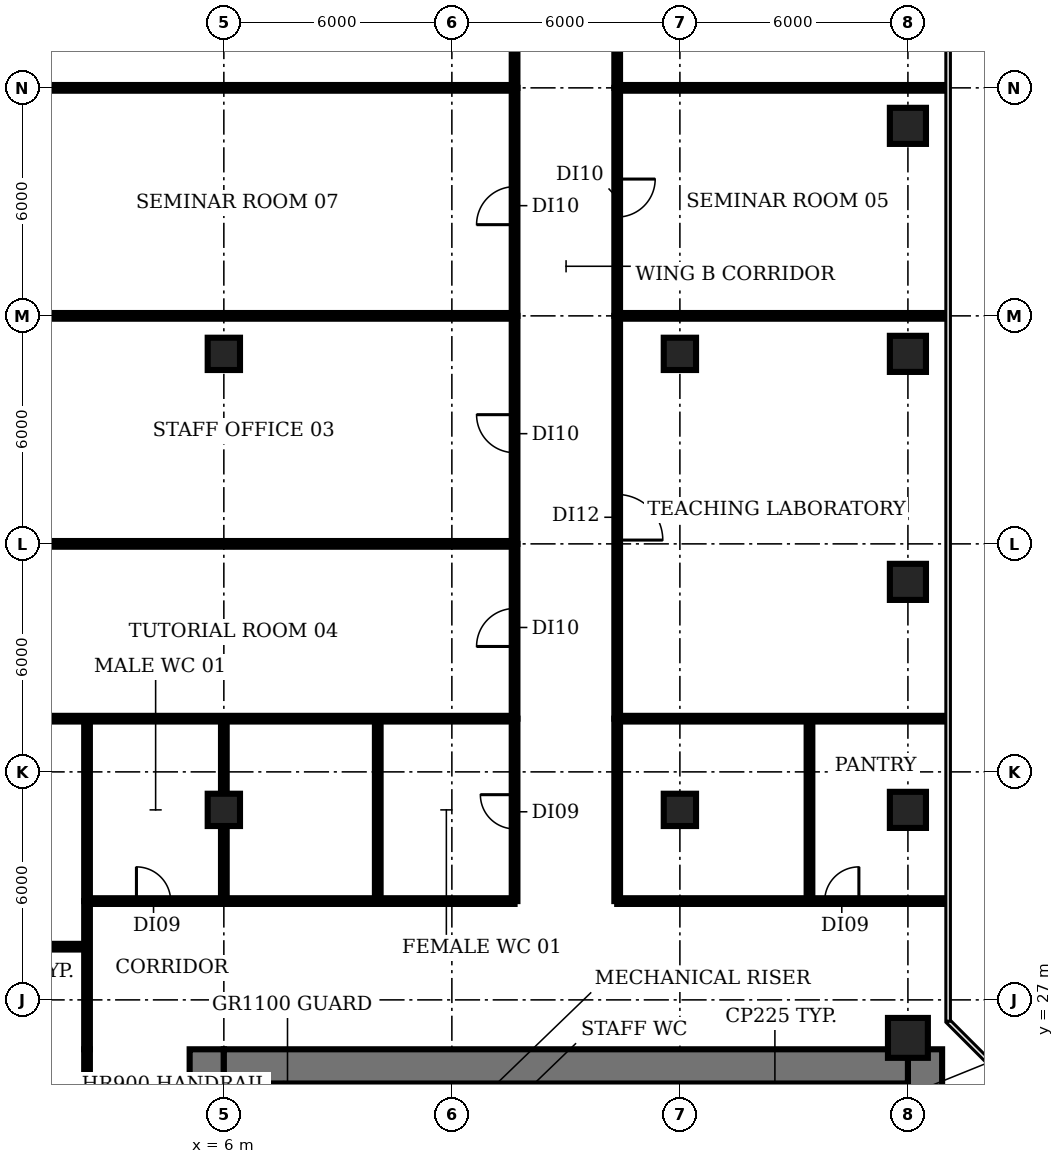
"""IFC4 building model, lengths in metres.
Left out: names, types, materials, properties, quantities, classifications, styles, units other than length and angle.
Written with IfcOpenShell. Run it as: python <this file> out.ifc"""

import sys

from ifc_helpers import new_model, si_unit, direction, frame, frame_2d, origin, origin_2d, place, context, subcontext, project, spatial, rectangle, circle, extrude, element, fill, save


model = new_model("IFC4")
c1 = context("Model", 3, precision=1e-05, world=origin(), true_north=direction((0.0, 1.0)))
c2 = subcontext(c1, "Body", "Model", "MODEL_VIEW")
j1 = project(units=[si_unit("LENGTHUNIT", "METRE"), si_unit("PLANEANGLEUNIT", "RADIAN")], contexts=[c1])
p1 = place(None, origin())
s1 = spatial("IfcSite", under=j1, at=p1, CompositionType="ELEMENT")
p2 = place(p1, origin())
s2 = spatial("IfcBuilding", under=s1, at=p2, CompositionType="ELEMENT")
p3 = place(p2, frame((0.0, 0.0, 66.8)))
s3 = spatial("IfcBuildingStorey", under=s2, at=p3, CompositionType="ELEMENT", Elevation=66.8)
for number, where, z_axis, x_axis in (
    (1, (6.0, 32.0, 0.0), (0.0, 0.0, 1.0), (1.0, 0.0, 0.0)),
    (2, (6.0, 44.0, 0.0), (0.0, 0.0, 1.0), (1.0, 0.0, 0.0)),
    (3, (18.0, 32.0, 0.0), (0.0, 0.0, 1.0), (1.0, 0.0, 0.0)),
    (4, (18.0, 44.0, 0.0), (0.0, 0.0, 1.0), (1.0, 0.0, 0.0)),
):
    element("IfcColumn", number, at=place(p3, frame(where, z_axis=z_axis, x_axis=x_axis)), inside=s3, PredefinedType="COLUMN", context=c2, shape_type="SweptSolid", body=[
        extrude(rectangle(XDim=0.85, YDim=0.85, at=origin_2d()), origin(), (0.0, 0.0, 1.0), 3.85),
    ])
p4 = place(p3, frame((24.0, 26.0, 0.0), z_axis=(0.0, 0.0, 1.0), x_axis=(1.0, 0.0, 0.0)))
e5 = element("IfcColumn", 5, at=p4, inside=s3, PredefinedType="COLUMN", context=c2, shape_type="SweptSolid", body=[
    extrude(circle(Radius=0.525, at=origin_2d()), origin(), (0.0, 0.0, 1.0), 3.85),
])
for number, where, z_axis, x_axis in (
    (6, (24.0, 32.0, 0.0), (0.0, 0.0, 1.0), (1.0, 0.0, 0.0)),
    (7, (24.0, 38.0, 0.0), (0.0, 0.0, 1.0), (1.0, 0.0, 0.0)),
    (8, (24.0, 44.0, 0.0), (0.0, 0.0, 1.0), (1.0, 0.0, 0.0)),
    (9, (24.0, 50.0, 0.0), (0.0, 0.0, 1.0), (1.0, 0.0, 0.0)),
):
    element("IfcColumn", number, at=place(p3, frame(where, z_axis=z_axis, x_axis=x_axis)), inside=s3, PredefinedType="COLUMN", context=c2, shape_type="SweptSolid", body=[
        extrude(rectangle(XDim=0.95, YDim=0.95, at=origin_2d()), origin(), (0.0, 0.0, 1.0), 3.85),
    ])
p5 = place(p3, frame((9.275, 18.375, 0.0), z_axis=(0.0, 0.0, 1.0), x_axis=(0.0, 1.0, 0.0)))
e10 = element("IfcWall", 10, at=p5, inside=s3, PredefinedType="SHEAR", context=c2, shape_type="SweptSolid", body=[
    extrude(rectangle(XDim=6.425, YDim=0.25, at=frame_2d((3.212, 0.0))), origin(), (0.0, 0.0, 1.0), 3.85),
])
for number, where, z_axis, x_axis in (
    (11, (15.1, 22.9, 0.0), (0.0, 0.0, 1.0), (0.0, 1.0, 0.0)),
    (12, (20.7, 22.9, 0.0), (0.0, 0.0, 1.0), (0.0, 1.0, 0.0)),
):
    element("IfcWall", number, at=place(p3, frame(where, z_axis=z_axis, x_axis=x_axis)), inside=s3, PredefinedType="SHEAR", context=c2, shape_type="SweptSolid", body=[
        extrude(rectangle(XDim=1.9, YDim=0.2, at=frame_2d((0.95, 0.0))), origin(), (0.0, 0.0, 1.0), 3.85),
    ])
p6 = place(p3, frame((5.55, 4.5, 0.0), z_axis=(0.0, 0.0, 1.0), x_axis=(0.0, 1.0, 0.0)))
e13 = element("IfcWall", 13, at=p6, inside=s3, PredefinedType="SHEAR", context=c2, shape_type="SweptSolid", body=[
    extrude(rectangle(XDim=21.2, YDim=0.9, at=frame_2d((10.6, 0.0))), origin(), (0.0, 0.0, 1.0), 3.85),
])
p7 = place(p6, frame((1.15, 0.0, 0.0)))
e14 = element("IfcOpeningElement", 14, at=p7, cuts=e13, PredefinedType="OPENING", context=c2, shape_type="SweptSolid", body=[
    extrude(rectangle(XDim=1.5, YDim=2.1, at=frame_2d((0.75, 1.05))), frame((0.0, 0.46, 0.0), z_axis=(0.0, -1.0, 0.0), x_axis=(1.0, 0.0, 0.0)), (0.0, 0.0, 1.0), 0.92),
])
p8 = place(p6, frame((7.6, 0.0, 0.0)))
e15 = element("IfcOpeningElement", 15, at=p8, cuts=e13, PredefinedType="OPENING", context=c2, shape_type="SweptSolid", body=[
    extrude(rectangle(XDim=1.2, YDim=2.1, at=frame_2d((0.6, 1.05))), frame((0.0, 0.46, 0.0), z_axis=(0.0, -1.0, 0.0), x_axis=(1.0, 0.0, 0.0)), (0.0, 0.0, 1.0), 0.92),
])
p9 = place(p6, frame((14.15, 0.0, 0.0)))
e16 = element("IfcOpeningElement", 16, at=p9, cuts=e13, PredefinedType="OPENING", context=c2, shape_type="SweptSolid", body=[
    extrude(rectangle(XDim=1.2, YDim=2.1, at=frame_2d((0.6, 1.05))), frame((0.0, 0.46, 0.0), z_axis=(0.0, -1.0, 0.0), x_axis=(1.0, 0.0, 0.0)), (0.0, 0.0, 1.0), 0.92),
])
p10 = place(p3, frame((24.45, 25.7, 0.0), z_axis=(0.0, 0.0, 1.0), x_axis=(0.0, -1.0, 0.0)))
e17 = element("IfcWall", 17, at=p10, inside=s3, PredefinedType="SHEAR", context=c2, shape_type="SweptSolid", body=[
    extrude(rectangle(XDim=21.2, YDim=0.9, at=frame_2d((10.6, 0.0))), origin(), (0.0, 0.0, 1.0), 3.85),
])
p11 = place(p10, frame((18.55, 0.0, 0.0)))
e18 = element("IfcOpeningElement", 18, at=p11, cuts=e17, PredefinedType="OPENING", context=c2, shape_type="SweptSolid", body=[
    extrude(rectangle(XDim=1.5, YDim=2.1, at=frame_2d((0.75, 1.05))), frame((0.0, 0.46, 0.0), z_axis=(0.0, -1.0, 0.0), x_axis=(1.0, 0.0, 0.0)), (0.0, 0.0, 1.0), 0.92),
])
p12 = place(p10, frame((12.45, 0.0, 0.0)))
e19 = element("IfcOpeningElement", 19, at=p12, cuts=e17, PredefinedType="OPENING", context=c2, shape_type="SweptSolid", body=[
    extrude(rectangle(XDim=0.9, YDim=2.1, at=frame_2d((0.45, 1.05))), frame((0.0, 0.46, 0.0), z_axis=(0.0, -1.0, 0.0), x_axis=(1.0, 0.0, 0.0)), (0.0, 0.0, 1.0), 0.92),
])
p13 = place(p10, frame((6.45, 0.0, 0.0)))
e20 = element("IfcOpeningElement", 20, at=p13, cuts=e17, PredefinedType="OPENING", context=c2, shape_type="SweptSolid", body=[
    extrude(rectangle(XDim=2.0, YDim=2.1, at=frame_2d((1.0, 1.05))), frame((0.0, 0.46, 0.0), z_axis=(0.0, -1.0, 0.0), x_axis=(1.0, 0.0, 0.0)), (0.0, 0.0, 1.0), 0.92),
])
p14 = place(p3, frame((6.0, 25.25, 0.0), z_axis=(0.0, 0.0, 1.0), x_axis=(1.0, 0.0, 0.0)))
e21 = element("IfcWall", 21, at=p14, inside=s3, PredefinedType="SHEAR", context=c2, shape_type="SweptSolid", body=[
    extrude(rectangle(XDim=18.0, YDim=0.9, at=frame_2d((9.0, 0.0))), origin(), (0.0, 0.0, 1.0), 3.85),
])
p15 = place(p3, frame((-1.01, 28.4, 0.0), z_axis=(0.0, 0.0, 1.0), x_axis=(1.0, 0.0, 0.0)))
e22 = element("IfcWall", 22, at=p15, inside=s3, PredefinedType="PARTITIONING", context=c2, shape_type="SweptSolid", body=[
    extrude(rectangle(XDim=3.41, YDim=0.15, at=frame_2d((1.705, 0.0))), origin(), (0.0, 0.0, 1.0), 2.83),
])
for number, where, z_axis, x_axis in (
    (23, (-1.01, 34.4, 0.0), (0.0, 0.0, 1.0), (1.0, 0.0, 0.0)),
    (24, (-1.01, 39.0, 0.0), (0.0, 0.0, 1.0), (1.0, 0.0, 0.0)),
    (25, (-1.01, 45.0, 0.0), (0.0, 0.0, 1.0), (1.0, 0.0, 0.0)),
    (26, (-1.01, 51.0, 0.0), (0.0, 0.0, 1.0), (1.0, 0.0, 0.0)),
):
    element("IfcWall", number, at=place(p3, frame(where, z_axis=z_axis, x_axis=x_axis)), inside=s3, PredefinedType="PARTITIONING", context=c2, shape_type="SweptSolid", body=[
        extrude(rectangle(XDim=14.66, YDim=0.15, at=frame_2d((7.33, 0.0))), origin(), (0.0, 0.0, 1.0), 2.83),
    ])
p16 = place(p3, frame((2.4, 4.5, 0.0), z_axis=(0.0, 0.0, 1.0), x_axis=(0.0, 1.0, 0.0)))
e27 = element("IfcWall", 27, at=p16, inside=s3, PredefinedType="PARTITIONING", context=c2, shape_type="SweptSolid", body=[
    extrude(rectangle(XDim=21.2, YDim=0.15, at=frame_2d((10.6, 0.0))), origin(), (0.0, 0.0, 1.0), 2.83),
])
p17 = place(p16, frame((10.8, 0.0, 0.0)))
e28 = element("IfcOpeningElement", 28, at=p17, cuts=e27, PredefinedType="OPENING", context=c2, shape_type="SweptSolid", body=[
    extrude(rectangle(XDim=1.2, YDim=2.1, at=frame_2d((0.6, 1.05))), frame((0.0, 0.085, 0.0), z_axis=(0.0, -1.0, 0.0), x_axis=(1.0, 0.0, 0.0)), (0.0, 0.0, 1.0), 0.17),
])
p18 = place(p3, frame((2.4, 25.7, 0.0), z_axis=(0.0, 0.0, 1.0), x_axis=(0.0, 1.0, 0.0)))
e29 = element("IfcWall", 29, at=p18, inside=s3, PredefinedType="PARTITIONING", context=c2, shape_type="SweptSolid", body=[
    extrude(rectangle(XDim=3.9, YDim=0.15, at=frame_2d((1.95, 0.0))), origin(), (0.0, 0.0, 1.0), 2.83),
])
p19 = place(p3, frame((2.4, 29.6, 0.0), z_axis=(0.0, 0.0, 1.0), x_axis=(0.0, 1.0, 0.0)))
e30 = element("IfcWall", 30, at=p19, inside=s3, PredefinedType="PARTITIONING", context=c2, shape_type="SweptSolid", body=[
    extrude(rectangle(XDim=4.8, YDim=0.15, at=frame_2d((2.4, 0.0))), origin(), (0.0, 0.0, 1.0), 2.83),
])
p20 = place(p3, frame((2.4, 29.6, 0.0), z_axis=(0.0, 0.0, 1.0), x_axis=(1.0, 0.0, 0.0)))
e31 = element("IfcWall", 31, at=p20, inside=s3, PredefinedType="PARTITIONING", context=c2, shape_type="SweptSolid", body=[
    extrude(rectangle(XDim=3.6, YDim=0.15, at=frame_2d((1.8, 0.0))), origin(), (0.0, 0.0, 1.0), 2.83),
])
p21 = place(p20, frame((1.3, 0.0, 0.0)))
e32 = element("IfcOpeningElement", 32, at=p21, cuts=e31, PredefinedType="OPENING", context=c2, shape_type="SweptSolid", body=[
    extrude(rectangle(XDim=0.9, YDim=2.1, at=frame_2d((0.45, 1.05))), frame((0.0, 0.085, 0.0), z_axis=(0.0, -1.0, 0.0), x_axis=(1.0, 0.0, 0.0)), (0.0, 0.0, 1.0), 0.17),
])
p22 = place(p3, frame((6.0, 29.6, 0.0), z_axis=(0.0, 0.0, 1.0), x_axis=(0.0, 1.0, 0.0)))
e33 = element("IfcWall", 33, at=p22, inside=s3, PredefinedType="PARTITIONING", context=c2, shape_type="SweptSolid", body=[
    extrude(rectangle(XDim=4.8, YDim=0.15, at=frame_2d((2.4, 0.0))), origin(), (0.0, 0.0, 1.0), 2.83),
])
p23 = place(p3, frame((6.0, 29.6, 0.0), z_axis=(0.0, 0.0, 1.0), x_axis=(1.0, 0.0, 0.0)))
e34 = element("IfcWall", 34, at=p23, inside=s3, PredefinedType="PARTITIONING", context=c2, shape_type="SweptSolid", body=[
    extrude(rectangle(XDim=7.65, YDim=0.15, at=frame_2d((3.825, 0.0))), origin(), (0.0, 0.0, 1.0), 2.83),
])
p24 = place(p3, frame((10.05, 29.6, 0.0), z_axis=(0.0, 0.0, 1.0), x_axis=(0.0, 1.0, 0.0)))
e35 = element("IfcWall", 35, at=p24, inside=s3, PredefinedType="PARTITIONING", context=c2, shape_type="SweptSolid", body=[
    extrude(rectangle(XDim=4.8, YDim=0.15, at=frame_2d((2.4, 0.0))), origin(), (0.0, 0.0, 1.0), 2.83),
])
p25 = place(p3, frame((13.65, 29.6, 0.0), z_axis=(0.0, 0.0, 1.0), x_axis=(0.0, 1.0, 0.0)))
e36 = element("IfcWall", 36, at=p25, inside=s3, PredefinedType="PARTITIONING", context=c2, shape_type="SweptSolid", body=[
    extrude(rectangle(XDim=4.8, YDim=0.15, at=frame_2d((2.4, 0.0))), origin(), (0.0, 0.0, 1.0), 2.83),
])
p26 = place(p25, frame((1.9, 0.0, 0.0)))
e37 = element("IfcOpeningElement", 37, at=p26, cuts=e36, PredefinedType="OPENING", context=c2, shape_type="SweptSolid", body=[
    extrude(rectangle(XDim=0.9, YDim=2.1, at=frame_2d((0.45, 1.05))), frame((0.0, 0.085, 0.0), z_axis=(0.0, -1.0, 0.0), x_axis=(1.0, 0.0, 0.0)), (0.0, 0.0, 1.0), 0.17),
])
p27 = place(p3, frame((13.65, 34.4, 0.0), z_axis=(0.0, 0.0, 1.0), x_axis=(0.0, 1.0, 0.0)))
e38 = element("IfcWall", 38, at=p27, inside=s3, PredefinedType="PARTITIONING", context=c2, shape_type="SweptSolid", body=[
    extrude(rectangle(XDim=4.6, YDim=0.15, at=frame_2d((2.3, 0.0))), origin(), (0.0, 0.0, 1.0), 2.83),
])
p28 = place(p27, frame((1.9, 0.0, 0.0)))
e39 = element("IfcOpeningElement", 39, at=p28, cuts=e38, PredefinedType="OPENING", context=c2, shape_type="SweptSolid", body=[
    extrude(rectangle(XDim=1.0, YDim=2.1, at=frame_2d((0.5, 1.05))), frame((0.0, 0.085, 0.0), z_axis=(0.0, -1.0, 0.0), x_axis=(1.0, 0.0, 0.0)), (0.0, 0.0, 1.0), 0.17),
])
p29 = place(p3, frame((13.65, 39.0, 0.0), z_axis=(0.0, 0.0, 1.0), x_axis=(0.0, 1.0, 0.0)))
e40 = element("IfcWall", 40, at=p29, inside=s3, PredefinedType="PARTITIONING", context=c2, shape_type="SweptSolid", body=[
    extrude(rectangle(XDim=6.0, YDim=0.15, at=frame_2d((3.0, 0.0))), origin(), (0.0, 0.0, 1.0), 2.83),
])
p30 = place(p29, frame((2.4, 0.0, 0.0)))
e41 = element("IfcOpeningElement", 41, at=p30, cuts=e40, PredefinedType="OPENING", context=c2, shape_type="SweptSolid", body=[
    extrude(rectangle(XDim=1.0, YDim=2.1, at=frame_2d((0.5, 1.05))), frame((0.0, 0.085, 0.0), z_axis=(0.0, -1.0, 0.0), x_axis=(1.0, 0.0, 0.0)), (0.0, 0.0, 1.0), 0.17),
])
p31 = place(p3, frame((13.65, 45.0, 0.0), z_axis=(0.0, 0.0, 1.0), x_axis=(0.0, 1.0, 0.0)))
e42 = element("IfcWall", 42, at=p31, inside=s3, PredefinedType="PARTITIONING", context=c2, shape_type="SweptSolid", body=[
    extrude(rectangle(XDim=6.0, YDim=0.15, at=frame_2d((3.0, 0.0))), origin(), (0.0, 0.0, 1.0), 2.83),
])
p32 = place(p31, frame((2.4, 0.0, 0.0)))
e43 = element("IfcOpeningElement", 43, at=p32, cuts=e42, PredefinedType="OPENING", context=c2, shape_type="SweptSolid", body=[
    extrude(rectangle(XDim=1.0, YDim=2.1, at=frame_2d((0.5, 1.05))), frame((0.0, 0.085, 0.0), z_axis=(0.0, -1.0, 0.0), x_axis=(1.0, 0.0, 0.0)), (0.0, 0.0, 1.0), 0.17),
])
p33 = place(p3, frame((13.65, 51.0, 0.0), z_axis=(0.0, 0.0, 1.0), x_axis=(0.0, 1.0, 0.0)))
e44 = element("IfcWall", 44, at=p33, inside=s3, PredefinedType="PARTITIONING", context=c2, shape_type="SweptSolid", body=[
    extrude(rectangle(XDim=6.0, YDim=0.15, at=frame_2d((3.0, 0.0))), origin(), (0.0, 0.0, 1.0), 2.83),
])
p34 = place(p33, frame((2.4, 0.0, 0.0)))
e45 = element("IfcOpeningElement", 45, at=p34, cuts=e44, PredefinedType="OPENING", context=c2, shape_type="SweptSolid", body=[
    extrude(rectangle(XDim=1.0, YDim=2.1, at=frame_2d((0.5, 1.05))), frame((0.0, 0.085, 0.0), z_axis=(0.0, -1.0, 0.0), x_axis=(1.0, 0.0, 0.0)), (0.0, 0.0, 1.0), 0.17),
])
p35 = place(p3, frame((16.35, 29.6, 0.0), z_axis=(0.0, 0.0, 1.0), x_axis=(0.0, 1.0, 0.0)))
e46 = element("IfcWall", 46, at=p35, inside=s3, PredefinedType="PARTITIONING", context=c2, shape_type="SweptSolid", body=[
    extrude(rectangle(XDim=4.8, YDim=0.15, at=frame_2d((2.4, 0.0))), origin(), (0.0, 0.0, 1.0), 2.83),
])
p36 = place(p3, frame((16.35, 29.6, 0.0), z_axis=(0.0, 0.0, 1.0), x_axis=(1.0, 0.0, 0.0)))
e47 = element("IfcWall", 47, at=p36, inside=s3, PredefinedType="PARTITIONING", context=c2, shape_type="SweptSolid", body=[
    extrude(rectangle(XDim=5.06, YDim=0.15, at=frame_2d((2.53, 0.0))), origin(), (0.0, 0.0, 1.0), 2.83),
])
p37 = place(p3, frame((16.35, 34.4, 0.0), z_axis=(0.0, 0.0, 1.0), x_axis=(1.0, 0.0, 0.0)))
e48 = element("IfcWall", 48, at=p37, inside=s3, PredefinedType="PARTITIONING", context=c2, shape_type="SweptSolid", body=[
    extrude(rectangle(XDim=8.66, YDim=0.15, at=frame_2d((4.33, 0.0))), origin(), (0.0, 0.0, 1.0), 2.83),
])
p38 = place(p3, frame((16.35, 45.0, 0.0), z_axis=(0.0, 0.0, 1.0), x_axis=(0.0, -1.0, 0.0)))
e49 = element("IfcWall", 49, at=p38, inside=s3, PredefinedType="PARTITIONING", context=c2, shape_type="SweptSolid", body=[
    extrude(rectangle(XDim=10.6, YDim=0.15, at=frame_2d((5.3, 0.0))), origin(), (0.0, 0.0, 1.0), 2.83),
])
p39 = place(p38, frame((4.7, 0.0, 0.0)))
e50 = element("IfcOpeningElement", 50, at=p39, cuts=e49, PredefinedType="OPENING", context=c2, shape_type="SweptSolid", body=[
    extrude(rectangle(XDim=1.2, YDim=2.1, at=frame_2d((0.6, 1.05))), frame((0.0, 0.085, 0.0), z_axis=(0.0, -1.0, 0.0), x_axis=(1.0, 0.0, 0.0)), (0.0, 0.0, 1.0), 0.17),
])
p40 = place(p3, frame((16.35, 45.0, 0.0), z_axis=(0.0, 0.0, 1.0), x_axis=(1.0, 0.0, 0.0)))
e51 = element("IfcWall", 51, at=p40, inside=s3, PredefinedType="PARTITIONING", context=c2, shape_type="SweptSolid", body=[
    extrude(rectangle(XDim=8.66, YDim=0.15, at=frame_2d((4.33, 0.0))), origin(), (0.0, 0.0, 1.0), 2.83),
])
p41 = place(p3, frame((16.35, 51.0, 0.0), z_axis=(0.0, 0.0, 1.0), x_axis=(0.0, -1.0, 0.0)))
e52 = element("IfcWall", 52, at=p41, inside=s3, PredefinedType="PARTITIONING", context=c2, shape_type="SweptSolid", body=[
    extrude(rectangle(XDim=6.0, YDim=0.15, at=frame_2d((3.0, 0.0))), origin(), (0.0, 0.0, 1.0), 2.83),
])
p42 = place(p41, frame((2.4, 0.0, 0.0)))
e53 = element("IfcOpeningElement", 53, at=p42, cuts=e52, PredefinedType="OPENING", context=c2, shape_type="SweptSolid", body=[
    extrude(rectangle(XDim=1.0, YDim=2.1, at=frame_2d((0.5, 1.05))), frame((0.0, 0.085, 0.0), z_axis=(0.0, -1.0, 0.0), x_axis=(1.0, 0.0, 0.0)), (0.0, 0.0, 1.0), 0.17),
])
p43 = place(p3, frame((16.35, 51.0, 0.0), z_axis=(0.0, 0.0, 1.0), x_axis=(1.0, 0.0, 0.0)))
e54 = element("IfcWall", 54, at=p43, inside=s3, PredefinedType="PARTITIONING", context=c2, shape_type="SweptSolid", body=[
    extrude(rectangle(XDim=8.66, YDim=0.15, at=frame_2d((4.33, 0.0))), origin(), (0.0, 0.0, 1.0), 2.83),
])
p44 = place(p3, frame((16.35, 57.0, 0.0), z_axis=(0.0, 0.0, 1.0), x_axis=(0.0, -1.0, 0.0)))
e55 = element("IfcWall", 55, at=p44, inside=s3, PredefinedType="PARTITIONING", context=c2, shape_type="SweptSolid", body=[
    extrude(rectangle(XDim=6.0, YDim=0.15, at=frame_2d((3.0, 0.0))), origin(), (0.0, 0.0, 1.0), 2.83),
])
p45 = place(p44, frame((3.3, 0.0, 0.0)))
e56 = element("IfcOpeningElement", 56, at=p45, cuts=e55, PredefinedType="OPENING", context=c2, shape_type="SweptSolid", body=[
    extrude(rectangle(XDim=1.0, YDim=2.1, at=frame_2d((0.5, 1.05))), frame((0.0, 0.085, 0.0), z_axis=(0.0, -1.0, 0.0), x_axis=(1.0, 0.0, 0.0)), (0.0, 0.0, 1.0), 0.17),
])
p46 = place(p3, frame((21.41, 29.6, 0.0), z_axis=(0.0, 0.0, 1.0), x_axis=(0.0, 1.0, 0.0)))
e57 = element("IfcWall", 57, at=p46, inside=s3, PredefinedType="PARTITIONING", context=c2, shape_type="SweptSolid", body=[
    extrude(rectangle(XDim=4.8, YDim=0.15, at=frame_2d((2.4, 0.0))), origin(), (0.0, 0.0, 1.0), 2.83),
])
p47 = place(p3, frame((21.41, 29.6, 0.0), z_axis=(0.0, 0.0, 1.0), x_axis=(1.0, 0.0, 0.0)))
e58 = element("IfcWall", 58, at=p47, inside=s3, PredefinedType="PARTITIONING", context=c2, shape_type="SweptSolid", body=[
    extrude(rectangle(XDim=3.6, YDim=0.15, at=frame_2d((1.8, 0.0))), origin(), (0.0, 0.0, 1.0), 2.83),
])
p48 = place(p47, frame((0.4, 0.0, 0.0)))
e59 = element("IfcOpeningElement", 59, at=p48, cuts=e58, PredefinedType="OPENING", context=c2, shape_type="SweptSolid", body=[
    extrude(rectangle(XDim=0.9, YDim=2.1, at=frame_2d((0.45, 1.05))), frame((0.0, 0.085, 0.0), z_axis=(0.0, -1.0, 0.0), x_axis=(1.0, 0.0, 0.0)), (0.0, 0.0, 1.0), 0.17),
])
p49 = place(p21, origin())
e60 = element("IfcDoor", 60, at=p49, inside=s3, OperationType="SINGLE_SWING_LEFT", PredefinedType="DOOR", context=c2, shape_type="SweptSolid", body=[
    extrude(rectangle(XDim=0.9, YDim=2.1, at=frame_2d((0.45, 1.05))), frame((0.0, 0.025, 0.0), z_axis=(0.0, -1.0, 0.0), x_axis=(1.0, 0.0, 0.0)), (0.0, 0.0, 1.0), 0.05),
])
fill(e32, e60)
p50 = place(p26, origin())
e61 = element("IfcDoor", 61, at=p50, inside=s3, OperationType="SINGLE_SWING_RIGHT", PredefinedType="DOOR", context=c2, shape_type="SweptSolid", body=[
    extrude(rectangle(XDim=0.9, YDim=2.1, at=frame_2d((0.45, 1.05))), frame((0.0, 0.025, 0.0), z_axis=(0.0, -1.0, 0.0), x_axis=(1.0, 0.0, 0.0)), (0.0, 0.0, 1.0), 0.05),
])
fill(e37, e61)
p51 = place(p28, origin())
e62 = element("IfcDoor", 62, at=p51, inside=s3, OperationType="SINGLE_SWING_LEFT", PredefinedType="DOOR", context=c2, shape_type="SweptSolid", body=[
    extrude(rectangle(XDim=1.0, YDim=2.1, at=frame_2d((0.5, 1.05))), frame((0.0, 0.025, 0.0), z_axis=(0.0, -1.0, 0.0), x_axis=(1.0, 0.0, 0.0)), (0.0, 0.0, 1.0), 0.05),
])
fill(e39, e62)
p52 = place(p30, origin())
e63 = element("IfcDoor", 63, at=p52, inside=s3, OperationType="SINGLE_SWING_RIGHT", PredefinedType="DOOR", context=c2, shape_type="SweptSolid", body=[
    extrude(rectangle(XDim=1.0, YDim=2.1, at=frame_2d((0.5, 1.05))), frame((0.0, 0.025, 0.0), z_axis=(0.0, -1.0, 0.0), x_axis=(1.0, 0.0, 0.0)), (0.0, 0.0, 1.0), 0.05),
])
fill(e41, e63)
p53 = place(p32, origin())
e64 = element("IfcDoor", 64, at=p53, inside=s3, OperationType="SINGLE_SWING_LEFT", PredefinedType="DOOR", context=c2, shape_type="SweptSolid", body=[
    extrude(rectangle(XDim=1.0, YDim=2.1, at=frame_2d((0.5, 1.05))), frame((0.0, 0.025, 0.0), z_axis=(0.0, -1.0, 0.0), x_axis=(1.0, 0.0, 0.0)), (0.0, 0.0, 1.0), 0.05),
])
fill(e43, e64)
p54 = place(p39, origin())
e65 = element("IfcDoor", 65, at=p54, inside=s3, OperationType="SINGLE_SWING_RIGHT", PredefinedType="DOOR", context=c2, shape_type="SweptSolid", body=[
    extrude(rectangle(XDim=1.2, YDim=2.1, at=frame_2d((0.6, 1.05))), frame((0.0, 0.025, 0.0), z_axis=(0.0, -1.0, 0.0), x_axis=(1.0, 0.0, 0.0)), (0.0, 0.0, 1.0), 0.05),
])
fill(e50, e65)
p55 = place(p42, origin())
e66 = element("IfcDoor", 66, at=p55, inside=s3, OperationType="SINGLE_SWING_LEFT", PredefinedType="DOOR", context=c2, shape_type="SweptSolid", body=[
    extrude(rectangle(XDim=1.0, YDim=2.1, at=frame_2d((0.5, 1.05))), frame((0.0, 0.025, 0.0), z_axis=(0.0, -1.0, 0.0), x_axis=(1.0, 0.0, 0.0)), (0.0, 0.0, 1.0), 0.05),
])
fill(e53, e66)
p56 = place(p48, origin())
e67 = element("IfcDoor", 67, at=p56, inside=s3, OperationType="SINGLE_SWING_RIGHT", PredefinedType="DOOR", context=c2, shape_type="SweptSolid", body=[
    extrude(rectangle(XDim=0.9, YDim=2.1, at=frame_2d((0.45, 1.05))), frame((0.0, 0.025, 0.0), z_axis=(0.0, -1.0, 0.0), x_axis=(1.0, 0.0, 0.0)), (0.0, 0.0, 1.0), 0.05),
])
fill(e59, e67)
save(model, sys.argv[1])
